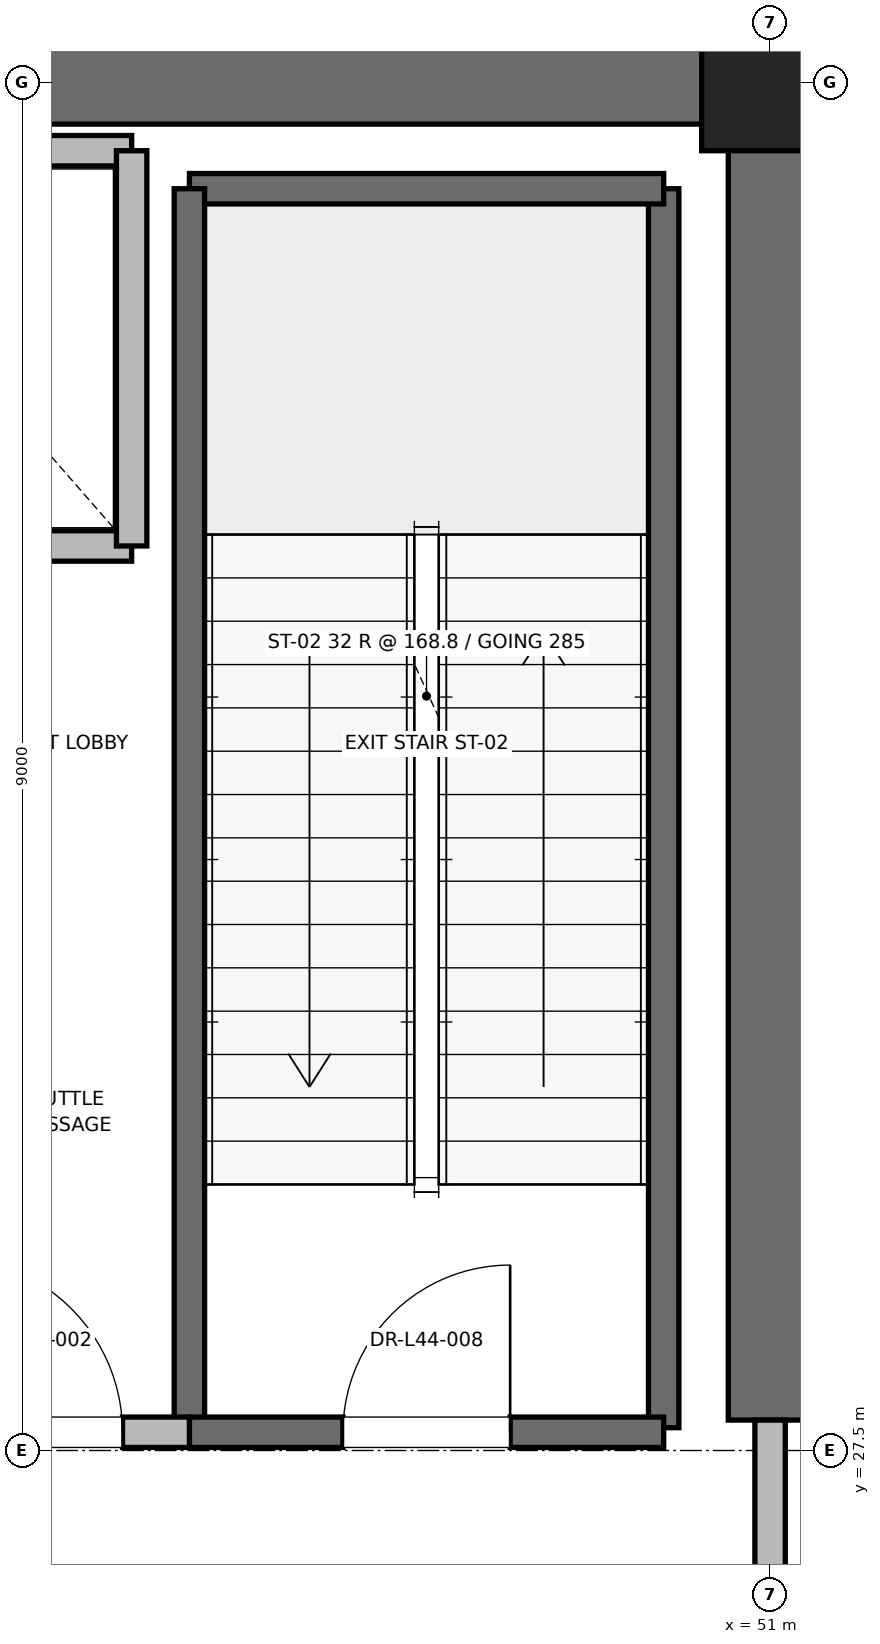
"""IFC4 building model, lengths in metres.
Left out: names, types, materials, properties, quantities, classifications, styles, units other than length and angle.
Written with IfcOpenShell. Run it as: python <this file> out.ifc"""

import sys

from ifc_helpers import new_model, si_unit, direction, frame, frame_2d, origin, origin_2d, place, context, subcontext, project, spatial, rectangle, extrude, element, fill, save


model = new_model("IFC4")
c1 = context("Model", 3, precision=1e-05, world=origin(), true_north=direction((0.0, 1.0)))
c2 = subcontext(c1, "Body", "Model", "MODEL_VIEW")
j1 = project(units=[si_unit("LENGTHUNIT", "METRE"), si_unit("PLANEANGLEUNIT", "RADIAN")], contexts=[c1])
p1 = place(None, origin())
s1 = spatial("IfcSite", under=j1, at=p1, CompositionType="ELEMENT")
p2 = place(p1, origin())
s2 = spatial("IfcBuilding", under=s1, at=p2, CompositionType="ELEMENT")
p3 = place(p2, frame((0.0, 0.0, 189.4)))
s3 = spatial("IfcBuildingStorey", under=s2, at=p3, CompositionType="ELEMENT", Elevation=189.4)
p4 = place(p3, frame((51.0, 36.5, 0.0), z_axis=(0.0, 0.0, 1.0), x_axis=(1.0, 0.0, 0.0)))
e1 = element("IfcColumn", 1, at=p4, inside=s3, PredefinedType="PILASTER", context=c2, shape_type="SweptSolid", body=[
    extrude(rectangle(XDim=0.9, YDim=0.9, at=origin_2d()), origin(), (0.0, 0.0, 1.0), 5.4),
])
p5 = place(p3, frame((45.2, 36.5, 0.0), z_axis=(0.0, 0.0, 1.0), x_axis=(1.0, 0.0, 0.0)))
e2 = element("IfcWall", 2, at=p5, inside=s3, PredefinedType="SHEAR", context=c2, shape_type="SweptSolid", body=[
    extrude(rectangle(XDim=5.8, YDim=0.55, at=frame_2d((2.9, 0.0))), origin(), (0.0, 0.0, 1.0), 5.1),
])
p6 = place(p3, frame((51.0, 27.7, 0.0), z_axis=(0.0, 0.0, 1.0), x_axis=(0.0, 1.0, 0.0)))
e3 = element("IfcWall", 3, at=p6, inside=s3, PredefinedType="SHEAR", context=c2, shape_type="SweptSolid", body=[
    extrude(rectangle(XDim=8.8, YDim=0.55, at=frame_2d((4.4, 0.0))), origin(), (0.0, 0.0, 1.0), 5.1),
])
p7 = place(p3, frame((50.3, 27.65, 0.0), z_axis=(0.0, 0.0, 1.0), x_axis=(0.0, 1.0, 0.0)))
e4 = element("IfcWall", 4, at=p7, inside=s3, PredefinedType="SOLIDWALL", context=c2, shape_type="SweptSolid", body=[
    extrude(rectangle(XDim=8.15, YDim=0.2, at=frame_2d((4.075, 0.0))), origin(), (0.0, 0.0, 1.0), 5.1),
])
p8 = place(p3, frame((47.18, 35.8, 0.0), z_axis=(0.0, 0.0, 1.0), x_axis=(1.0, 0.0, 0.0)))
e5 = element("IfcWall", 5, at=p8, inside=s3, PredefinedType="SOLIDWALL", context=c2, shape_type="SweptSolid", body=[
    extrude(rectangle(XDim=3.12, YDim=0.2, at=frame_2d((1.56, 0.0))), origin(), (0.0, 0.0, 1.0), 5.1),
])
p9 = place(p3, frame((47.18, 27.62, 0.0), z_axis=(0.0, 0.0, 1.0), x_axis=(0.0, 1.0, 0.0)))
e6 = element("IfcWall", 6, at=p9, inside=s3, PredefinedType="SOLIDWALL", context=c2, shape_type="SweptSolid", body=[
    extrude(rectangle(XDim=8.18, YDim=0.2, at=frame_2d((4.09, 0.0))), origin(), (0.0, 0.0, 1.0), 5.1),
])
p10 = place(p3, frame((47.18, 27.62, 0.0), z_axis=(0.0, 0.0, 1.0), x_axis=(1.0, 0.0, 0.0)))
e7 = element("IfcWall", 7, at=p10, inside=s3, PredefinedType="SOLIDWALL", context=c2, shape_type="SweptSolid", body=[
    extrude(rectangle(XDim=3.12, YDim=0.2, at=frame_2d((1.56, 0.0))), origin(), (0.0, 0.0, 1.0), 5.1),
])
p11 = place(p10, frame((1.01, 0.0, 0.0)))
e8 = element("IfcOpeningElement", 8, at=p11, cuts=e7, PredefinedType="OPENING", context=c2, shape_type="SweptSolid", body=[
    extrude(rectangle(XDim=1.1, YDim=2.15, at=frame_2d((0.55, 1.075))), frame((0.0, 0.1, 0.0), z_axis=(0.0, -1.0, 0.0), x_axis=(1.0, 0.0, 0.0)), (0.0, 0.0, 1.0), 0.2),
])
p12 = place(p3, frame((45.15, 27.62, 0.0), z_axis=(0.0, 0.0, 1.0), x_axis=(1.0, 0.0, 0.0)))
e9 = element("IfcWall", 9, at=p12, inside=s3, PredefinedType="PARTITIONING", context=c2, shape_type="SweptSolid", body=[
    extrude(rectangle(XDim=2.03, YDim=0.2, at=frame_2d((1.015, 0.0))), origin(), (0.0, 0.0, 1.0), 5.1),
])
p13 = place(p12, frame((0.44, 0.0, 0.0)))
e10 = element("IfcOpeningElement", 10, at=p13, cuts=e9, PredefinedType="OPENING", context=c2, shape_type="SweptSolid", body=[
    extrude(rectangle(XDim=1.15, YDim=2.2, at=frame_2d((0.575, 1.1))), frame((0.0, 0.1, 0.0), z_axis=(0.0, -1.0, 0.0), x_axis=(1.0, 0.0, 0.0)), (0.0, 0.0, 1.0), 0.2),
])
p14 = place(p3, frame((51.0, 24.3, 0.0), z_axis=(0.0, 0.0, 1.0), x_axis=(0.0, 1.0, 0.0)))
e11 = element("IfcWall", 11, at=p14, inside=s3, PredefinedType="PARTITIONING", context=c2, shape_type="SweptSolid", body=[
    extrude(rectangle(XDim=3.4, YDim=0.2, at=frame_2d((1.7, 0.0))), origin(), (0.0, 0.0, 1.0), 4.08),
])
p15 = place(p14, frame((1.125, 0.0, 0.0)))
e12 = element("IfcOpeningElement", 12, at=p15, cuts=e11, PredefinedType="OPENING", context=c2, shape_type="SweptSolid", body=[
    extrude(rectangle(XDim=1.15, YDim=2.2, at=frame_2d((0.575, 1.1))), frame((0.0, 0.1, 0.0), z_axis=(0.0, -1.0, 0.0), x_axis=(1.0, 0.0, 0.0)), (0.0, 0.0, 1.0), 0.2),
])
p16 = place(p3, frame((44.5, 33.45, 0.0), z_axis=(0.0, 0.0, 1.0), x_axis=(1.0, 0.0, 0.0)))
e13 = element("IfcWall", 13, at=p16, inside=s3, PredefinedType="SOLIDWALL", context=c2, shape_type="SweptSolid", body=[
    extrude(rectangle(XDim=2.3, YDim=0.2, at=frame_2d((1.15, 0.0))), origin(), (0.0, 0.0, 1.0), 5.1),
])
p17 = place(p3, frame((46.8, 36.05, 0.0), z_axis=(0.0, 0.0, 1.0), x_axis=(-1.0, 0.0, 0.0)))
e14 = element("IfcWall", 14, at=p17, inside=s3, PredefinedType="SOLIDWALL", context=c2, shape_type="SweptSolid", body=[
    extrude(rectangle(XDim=2.3, YDim=0.2, at=frame_2d((1.15, 0.0))), origin(), (0.0, 0.0, 1.0), 4.08),
])
p18 = place(p3, frame((46.8, 33.45, 0.0), z_axis=(0.0, 0.0, 1.0), x_axis=(0.0, 1.0, 0.0)))
e15 = element("IfcWall", 15, at=p18, inside=s3, PredefinedType="SOLIDWALL", context=c2, shape_type="SweptSolid", body=[
    extrude(rectangle(XDim=2.6, YDim=0.2, at=frame_2d((1.3, 0.0))), origin(), (0.0, 0.0, 1.0), 5.1),
])
p19 = place(p11, origin())
e16 = element("IfcDoor", 16, at=p19, inside=s3, OperationType="SINGLE_SWING_RIGHT", PredefinedType="DOOR", context=c2, shape_type="SweptSolid", body=[
    extrude(rectangle(XDim=1.1, YDim=2.15, at=frame_2d((0.55, 1.075))), frame((0.0, 0.025, 0.0), z_axis=(0.0, -1.0, 0.0), x_axis=(1.0, 0.0, 0.0)), (0.0, 0.0, 1.0), 0.05),
])
fill(e8, e16)
p20 = place(p13, origin())
e17 = element("IfcDoor", 17, at=p20, inside=s3, OperationType="SINGLE_SWING_LEFT", PredefinedType="DOOR", context=c2, shape_type="SweptSolid", body=[
    extrude(rectangle(XDim=1.15, YDim=2.2, at=frame_2d((0.575, 1.1))), frame((0.0, 0.025, 0.0), z_axis=(0.0, -1.0, 0.0), x_axis=(1.0, 0.0, 0.0)), (0.0, 0.0, 1.0), 0.05),
])
fill(e10, e17)
save(model, sys.argv[1])
